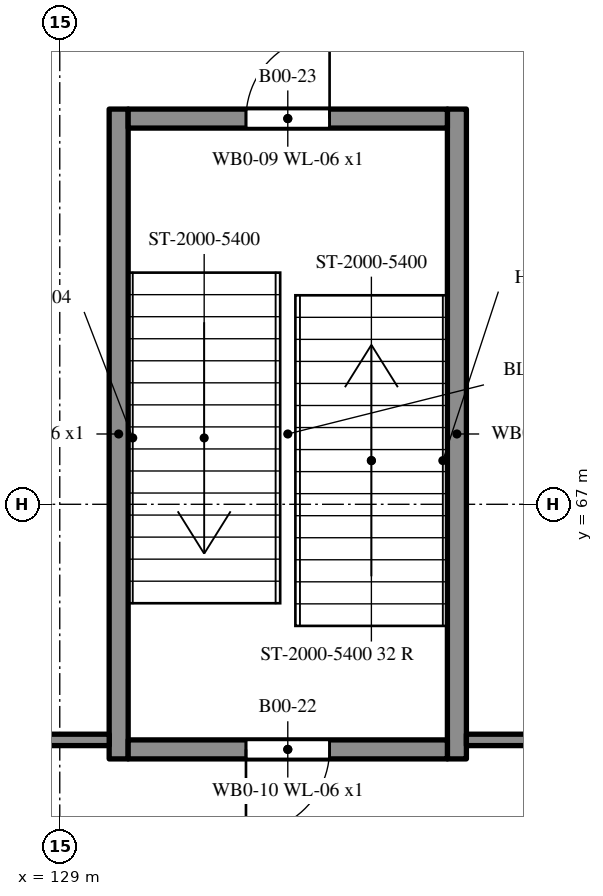
"""IFC4 building model, lengths in metres.
Left out: names, types, materials, properties, quantities, classifications, styles, units other than length and angle.
Written with IfcOpenShell. Run it as: python <this file> out.ifc"""

import sys

from ifc_helpers import new_model, si_unit, direction, frame, frame_2d, origin, place, context, subcontext, project, spatial, rectangle, extrude, element, fill, save


model = new_model("IFC4")
c1 = context("Model", 3, precision=1e-05, world=origin(), true_north=direction((0.0, 1.0)))
c2 = subcontext(c1, "Body", "Model", "MODEL_VIEW")
j1 = project(units=[si_unit("LENGTHUNIT", "METRE"), si_unit("PLANEANGLEUNIT", "RADIAN")], contexts=[c1])
p1 = place(None, origin())
s1 = spatial("IfcSite", under=j1, at=p1, CompositionType="ELEMENT")
p2 = place(p1, origin())
s2 = spatial("IfcBuilding", under=s1, at=p2, CompositionType="ELEMENT")
p3 = place(p2, origin())
s3 = spatial("IfcBuildingStorey", under=s2, at=p3, CompositionType="ELEMENT", Elevation=0.0)
for number, where, z_axis, x_axis in (
    (1, (134.225, 63.65, 0.0), (0.0, 0.0, 1.0), (0.0, 1.0, 0.0)),
    (2, (129.775, 72.2, 0.0), (0.0, 0.0, 1.0), (0.0, -1.0, 0.0)),
):
    element("IfcWall", number, at=place(p3, frame(where, z_axis=z_axis, x_axis=x_axis)), inside=s3, PredefinedType="SHEAR", context=c2, shape_type="SweptSolid", body=[
        extrude(rectangle(XDim=8.55, YDim=0.25, at=frame_2d((4.275, 0.0))), origin(), (0.0, 0.0, 1.0), 5.4),
    ])
p4 = place(p3, frame((129.9, 72.075, 0.0), z_axis=(0.0, 0.0, 1.0), x_axis=(1.0, 0.0, 0.0)))
e3 = element("IfcWall", 3, at=p4, inside=s3, PredefinedType="SHEAR", context=c2, shape_type="SweptSolid", body=[
    extrude(rectangle(XDim=4.2, YDim=0.25, at=frame_2d((2.1, 0.0))), origin(), (0.0, 0.0, 1.0), 5.4),
])
p5 = place(p4, frame((1.55, 0.0, 0.0)))
e4 = element("IfcOpeningElement", 4, at=p5, cuts=e3, PredefinedType="OPENING", context=c2, shape_type="SweptSolid", body=[
    extrude(rectangle(XDim=1.1, YDim=2.1, at=frame_2d((0.55, 1.05))), frame((0.0, 0.135, 0.0), z_axis=(0.0, -1.0, 0.0), x_axis=(1.0, 0.0, 0.0)), (0.0, 0.0, 1.0), 0.27),
])
p6 = place(p3, frame((134.1, 63.775, 0.0), z_axis=(0.0, 0.0, 1.0), x_axis=(-1.0, 0.0, 0.0)))
e5 = element("IfcWall", 5, at=p6, inside=s3, PredefinedType="SHEAR", context=c2, shape_type="SweptSolid", body=[
    extrude(rectangle(XDim=4.2, YDim=0.25, at=frame_2d((2.1, 0.0))), origin(), (0.0, 0.0, 1.0), 5.4),
])
p7 = place(p6, frame((1.55, 0.0, 0.0)))
e6 = element("IfcOpeningElement", 6, at=p7, cuts=e5, PredefinedType="OPENING", context=c2, shape_type="SweptSolid", body=[
    extrude(rectangle(XDim=1.1, YDim=2.1, at=frame_2d((0.55, 1.05))), frame((0.0, 0.135, 0.0), z_axis=(0.0, -1.0, 0.0), x_axis=(1.0, 0.0, 0.0)), (0.0, 0.0, 1.0), 0.27),
])
p8 = place(p3, frame((121.704, 63.9, 0.0), z_axis=(0.0, 0.0, 1.0), x_axis=(1.0, 0.0, 0.0)))
e7 = element("IfcWall", 7, at=p8, inside=s3, PredefinedType="PARTITIONING", context=c2, shape_type="SweptSolid", body=[
    extrude(rectangle(XDim=7.946, YDim=0.15, at=frame_2d((3.973, 0.0))), origin(), (0.0, 0.0, 1.0), 5.1),
])
p9 = place(p8, frame((3.523, 0.0, 0.0)))
e8 = element("IfcOpeningElement", 8, at=p9, cuts=e7, PredefinedType="OPENING", context=c2, shape_type="SweptSolid", body=[
    extrude(rectangle(XDim=0.9, YDim=2.1, at=frame_2d((0.45, 1.05))), frame((0.0, 0.085, 0.0), z_axis=(0.0, -1.0, 0.0), x_axis=(1.0, 0.0, 0.0)), (0.0, 0.0, 1.0), 0.17),
])
p10 = place(p3, frame((134.35, 63.9, 0.0), z_axis=(0.0, 0.0, 1.0), x_axis=(1.0, 0.0, 0.0)))
e9 = element("IfcWall", 9, at=p10, inside=s3, PredefinedType="PARTITIONING", context=c2, shape_type="SweptSolid", body=[
    extrude(rectangle(XDim=7.946, YDim=0.15, at=frame_2d((3.973, 0.0))), origin(), (0.0, 0.0, 1.0), 5.1),
])
p11 = place(p10, frame((3.523, 0.0, 0.0)))
e10 = element("IfcOpeningElement", 10, at=p11, cuts=e9, PredefinedType="OPENING", context=c2, shape_type="SweptSolid", body=[
    extrude(rectangle(XDim=0.9, YDim=2.1, at=frame_2d((0.45, 1.05))), frame((0.0, 0.085, 0.0), z_axis=(0.0, -1.0, 0.0), x_axis=(1.0, 0.0, 0.0)), (0.0, 0.0, 1.0), 0.17),
])
p12 = place(p7, origin())
e11 = element("IfcDoor", 11, at=p12, inside=s3, OperationType="SINGLE_SWING_RIGHT", PredefinedType="DOOR", context=c2, shape_type="SweptSolid", body=[
    extrude(rectangle(XDim=1.1, YDim=2.1, at=frame_2d((0.55, 1.05))), frame((0.0, 0.025, 0.0), z_axis=(0.0, -1.0, 0.0), x_axis=(1.0, 0.0, 0.0)), (0.0, 0.0, 1.0), 0.05),
])
fill(e6, e11)
p13 = place(p5, origin())
e12 = element("IfcDoor", 12, at=p13, inside=s3, OperationType="SINGLE_SWING_RIGHT", PredefinedType="DOOR", context=c2, shape_type="SweptSolid", body=[
    extrude(rectangle(XDim=1.1, YDim=2.1, at=frame_2d((0.55, 1.05))), frame((0.0, 0.025, 0.0), z_axis=(0.0, -1.0, 0.0), x_axis=(1.0, 0.0, 0.0)), (0.0, 0.0, 1.0), 0.05),
])
fill(e4, e12)
save(model, sys.argv[1])
